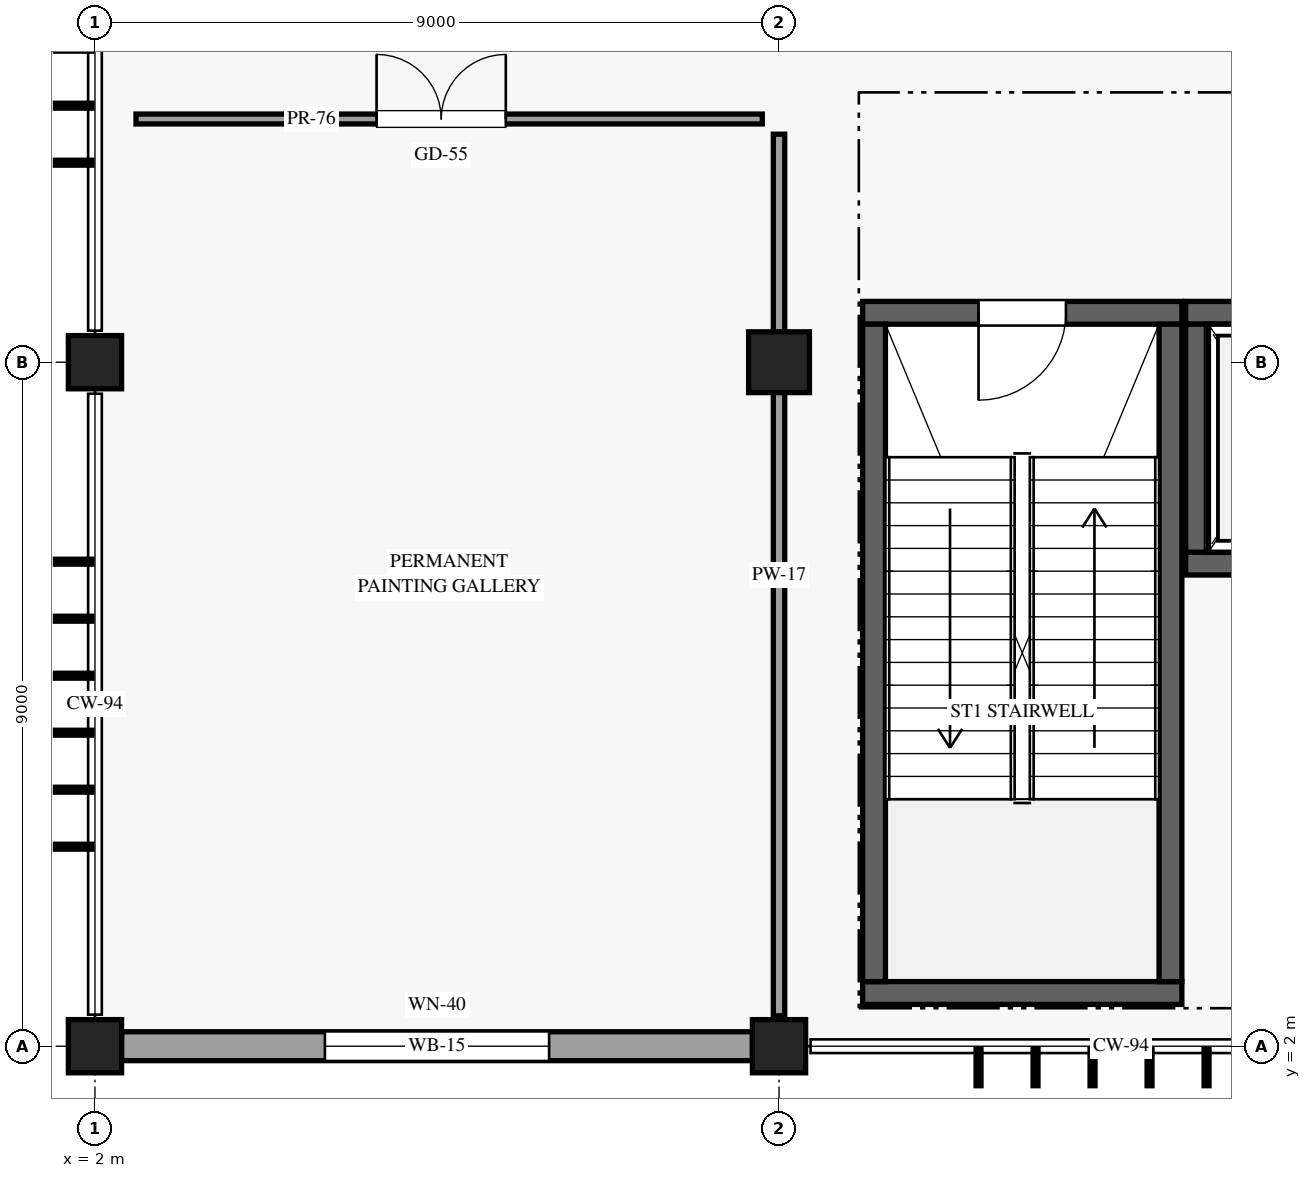
"""IFC4 building model, lengths in metres.
Left out: names, types, materials, properties, quantities, classifications, styles, units other than length and angle.
Written with IfcOpenShell. Run it as: python <this file> out.ifc"""

import sys

from ifc_helpers import new_model, si_unit, direction, frame, frame_2d, origin, origin_2d, place, context, subcontext, project, spatial, rectangle, circle, extrude, element, fill, save


model = new_model("IFC4")
c1 = context("Model", 3, precision=1e-05, world=origin(), true_north=direction((0.0, 1.0)))
c2 = subcontext(c1, "Body", "Model", "MODEL_VIEW")
j1 = project(units=[si_unit("LENGTHUNIT", "METRE"), si_unit("PLANEANGLEUNIT", "RADIAN")], contexts=[c1])
p1 = place(None, origin())
s1 = spatial("IfcSite", under=j1, at=p1, CompositionType="ELEMENT")
p2 = place(p1, origin())
s2 = spatial("IfcBuilding", under=s1, at=p2, CompositionType="ELEMENT")
p3 = place(p2, frame((0.0, 0.0, 5.4)))
s3 = spatial("IfcBuildingStorey", under=s2, at=p3, CompositionType="ELEMENT", Elevation=5.4)
for number, where, z_axis, x_axis in (
    (1, (2.0, 2.0, 0.0), (0.0, 0.0, 1.0), (1.0, 0.0, 0.0)),
    (2, (2.0, 11.0, 0.0), (0.0, 0.0, 1.0), (1.0, 0.0, 0.0)),
    (3, (11.0, 2.0, 0.0), (0.0, 0.0, 1.0), (1.0, 0.0, 0.0)),
):
    element("IfcColumn", number, at=place(p3, frame(where, z_axis=z_axis, x_axis=x_axis)), inside=s3, PredefinedType="COLUMN", context=c2, shape_type="SweptSolid", body=[
        extrude(rectangle(XDim=0.7, YDim=0.7, at=origin_2d()), origin(), (0.0, 0.0, 1.0), 4.8),
    ])
p4 = place(p3, frame((11.0, 11.0, 0.0), z_axis=(0.0, 0.0, 1.0), x_axis=(1.0, 0.0, 0.0)))
e4 = element("IfcColumn", 4, at=p4, inside=s3, PredefinedType="COLUMN", context=c2, shape_type="SweptSolid", body=[
    extrude(circle(Radius=0.4, at=origin_2d()), origin(), (0.0, 0.0, 1.0), 4.8),
])
p5 = place(p3, frame((2.35, 2.0, 0.0), z_axis=(0.0, 0.0, 1.0), x_axis=(1.0, 0.0, 0.0)))
e5 = element("IfcWall", 5, at=p5, inside=s3, PredefinedType="STANDARD", context=c2, shape_type="SweptSolid", body=[
    extrude(rectangle(XDim=8.3, YDim=0.38, at=frame_2d((4.15, 0.0))), origin(), (0.0, 0.0, 1.0), 3.575),
])
p6 = place(p5, frame((5.625, 0.0, 0.85), z_axis=(0.0, 0.0, 1.0), x_axis=(-1.0, 0.0, 0.0)))
e6 = element("IfcOpeningElement", 6, at=p6, cuts=e5, PredefinedType="OPENING", context=c2, shape_type="SweptSolid", body=[
    extrude(rectangle(XDim=2.95, YDim=2.5, at=frame_2d((1.475, 1.25))), frame((0.0, 0.2, 0.0), z_axis=(0.0, -1.0, 0.0), x_axis=(1.0, 0.0, 0.0)), (0.0, 0.0, 1.0), 0.4),
])
p7 = place(p3, frame((12.1, 11.65, 0.0), z_axis=(0.0, 0.0, 1.0), x_axis=(1.0, 0.0, 0.0)))
e7 = element("IfcWall", 7, at=p7, inside=s3, PredefinedType="SHEAR", context=c2, shape_type="SweptSolid", body=[
    extrude(rectangle(XDim=4.2, YDim=0.3, at=frame_2d((2.1, 0.0))), origin(), (0.0, 0.0, 1.0), 4.44),
])
p8 = place(p7, frame((2.675, 0.0, 0.0), z_axis=(0.0, 0.0, 1.0), x_axis=(-1.0, 0.0, 0.0)))
e8 = element("IfcOpeningElement", 8, at=p8, cuts=e7, PredefinedType="OPENING", context=c2, shape_type="SweptSolid", body=[
    extrude(rectangle(XDim=1.15, YDim=2.2, at=frame_2d((0.575, 1.1))), frame((0.0, 0.16, 0.0), z_axis=(0.0, -1.0, 0.0), x_axis=(1.0, 0.0, 0.0)), (0.0, 0.0, 1.0), 0.32),
])
p9 = place(p3, frame((12.1, 2.7, 0.0), z_axis=(0.0, 0.0, 1.0), x_axis=(1.0, 0.0, 0.0)))
e9 = element("IfcWall", 9, at=p9, inside=s3, PredefinedType="SHEAR", context=c2, shape_type="SweptSolid", body=[
    extrude(rectangle(XDim=4.2, YDim=0.3, at=frame_2d((2.1, 0.0))), origin(), (0.0, 0.0, 1.0), 4.44),
])
for number, where, z_axis, x_axis in (
    (10, (12.25, 2.85, 0.0), (0.0, 0.0, 1.0), (0.0, 1.0, 0.0)),
    (11, (16.15, 2.85, 0.0), (0.0, 0.0, 1.0), (0.0, 1.0, 0.0)),
):
    element("IfcWall", number, at=place(p3, frame(where, z_axis=z_axis, x_axis=x_axis)), inside=s3, PredefinedType="SHEAR", context=c2, shape_type="SweptSolid", body=[
        extrude(rectangle(XDim=8.65, YDim=0.3, at=frame_2d((4.325, 0.0))), origin(), (0.0, 0.0, 1.0), 4.44),
    ])
p10 = place(p3, frame((16.35, 11.65, 0.0), z_axis=(0.0, 0.0, 1.0), x_axis=(1.0, 0.0, 0.0)))
e12 = element("IfcWall", 12, at=p10, inside=s3, PredefinedType="SHEAR", context=c2, shape_type="SweptSolid", body=[
    extrude(rectangle(XDim=2.6, YDim=0.3, at=frame_2d((1.3, 0.0))), origin(), (0.0, 0.0, 1.0), 4.44),
])
p11 = place(p10, frame((0.75, 0.0, 0.0)))
e13 = element("IfcOpeningElement", 13, at=p11, cuts=e12, PredefinedType="OPENING", context=c2, shape_type="SweptSolid", body=[
    extrude(rectangle(XDim=1.1, YDim=2.2, at=frame_2d((0.55, 1.1))), frame((0.0, 0.16, 0.0), z_axis=(0.0, -1.0, 0.0), x_axis=(1.0, 0.0, 0.0)), (0.0, 0.0, 1.0), 0.32),
])
p12 = place(p3, frame((16.35, 8.35, 0.0), z_axis=(0.0, 0.0, 1.0), x_axis=(1.0, 0.0, 0.0)))
e14 = element("IfcWall", 14, at=p12, inside=s3, PredefinedType="SHEAR", context=c2, shape_type="SweptSolid", body=[
    extrude(rectangle(XDim=2.6, YDim=0.3, at=frame_2d((1.3, 0.0))), origin(), (0.0, 0.0, 1.0), 4.44),
])
p13 = place(p3, frame((16.5, 8.5, 0.0), z_axis=(0.0, 0.0, 1.0), x_axis=(0.0, 1.0, 0.0)))
e15 = element("IfcWall", 15, at=p13, inside=s3, PredefinedType="SHEAR", context=c2, shape_type="SweptSolid", body=[
    extrude(rectangle(XDim=3.0, YDim=0.3, at=frame_2d((1.5, 0.0))), origin(), (0.0, 0.0, 1.0), 4.44),
])
p14 = place(p3, frame((2.54, 14.2, 0.0), z_axis=(0.0, 0.0, 1.0), x_axis=(1.0, 0.0, 0.0)))
e16 = element("IfcWall", 16, at=p14, inside=s3, PredefinedType="PARTITIONING", context=c2, shape_type="SweptSolid", body=[
    extrude(rectangle(XDim=8.24, YDim=0.13, at=frame_2d((4.12, 0.0))), origin(), (0.0, 0.0, 1.0), 3.575),
])
p15 = place(p14, frame((3.165, 0.0, 0.0)))
e17 = element("IfcOpeningElement", 17, at=p15, cuts=e16, PredefinedType="OPENING", context=c2, shape_type="SweptSolid", body=[
    extrude(rectangle(XDim=1.7, YDim=2.44, at=frame_2d((0.85, 1.22))), frame((0.0, 0.075, 0.0), z_axis=(0.0, -1.0, 0.0), x_axis=(1.0, 0.0, 0.0)), (0.0, 0.0, 1.0), 0.15),
])
p16 = place(p3, frame((11.0, 2.4, 0.0), z_axis=(0.0, 0.0, 1.0), x_axis=(0.0, 1.0, 0.0)))
e18 = element("IfcWall", 18, at=p16, inside=s3, PredefinedType="PARTITIONING", context=c2, shape_type="SweptSolid", body=[
    extrude(rectangle(XDim=11.6, YDim=0.15, at=frame_2d((5.8, 0.0))), origin(), (0.0, 0.0, 1.0), 3.575),
])
p17 = place(p6, origin())
e19 = element("IfcWindow", 19, at=p17, inside=s3, PartitioningType="SINGLE_PANEL", PredefinedType="WINDOW", context=c2, shape_type="SweptSolid", body=[
    extrude(rectangle(XDim=2.95, YDim=2.5, at=frame_2d((1.475, 1.25))), frame((0.0, 0.03, 0.0), z_axis=(0.0, -1.0, 0.0), x_axis=(1.0, 0.0, 0.0)), (0.0, 0.0, 1.0), 0.06),
])
fill(e6, e19)
p18 = place(p8, origin())
e20 = element("IfcDoor", 20, at=p18, inside=s3, OperationType="SINGLE_SWING_RIGHT", PredefinedType="DOOR", context=c2, shape_type="SweptSolid", body=[
    extrude(rectangle(XDim=1.15, YDim=2.2, at=frame_2d((0.575, 1.1))), frame((0.0, 0.025, 0.0), z_axis=(0.0, -1.0, 0.0), x_axis=(1.0, 0.0, 0.0)), (0.0, 0.0, 1.0), 0.05),
])
fill(e8, e20)
p19 = place(p15, origin())
e21 = element("IfcDoor", 21, at=p19, inside=s3, OperationType="DOUBLE_DOOR_SINGLE_SWING", PredefinedType="DOOR", context=c2, shape_type="SweptSolid", body=[
    extrude(rectangle(XDim=1.7, YDim=2.44, at=frame_2d((0.85, 1.22))), frame((0.0, 0.025, 0.0), z_axis=(0.0, -1.0, 0.0), x_axis=(1.0, 0.0, 0.0)), (0.0, 0.0, 1.0), 0.05),
])
fill(e17, e21)
save(model, sys.argv[1])
